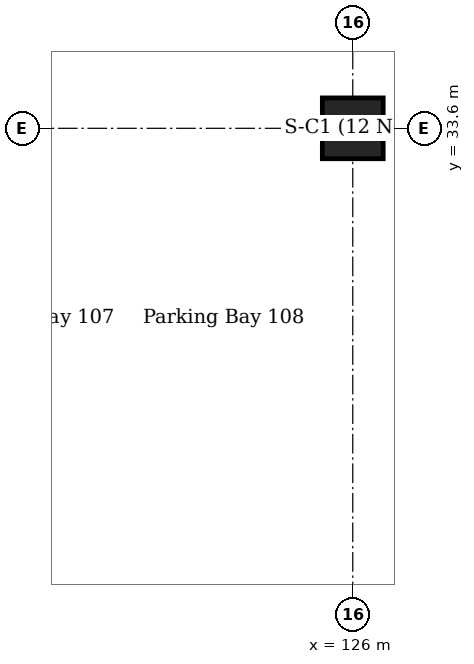
"""IFC4 building model, lengths in metres.
Left out: names, types, materials, properties, quantities, classifications, styles, units other than length and angle.
Written with IfcOpenShell. Run it as: python <this file> out.ifc"""

import sys

from ifc_helpers import new_model, si_unit, direction, frame, origin, origin_2d, place, context, subcontext, project, spatial, rectangle, extrude, element, save


model = new_model("IFC4")
c1 = context("Model", 3, precision=1e-05, world=origin(), true_north=direction((0.0, 1.0)))
c2 = subcontext(c1, "Body", "Model", "MODEL_VIEW")
j1 = project(units=[si_unit("LENGTHUNIT", "METRE"), si_unit("PLANEANGLEUNIT", "RADIAN")], contexts=[c1])
p1 = place(None, origin())
s1 = spatial("IfcSite", under=j1, at=p1, CompositionType="ELEMENT")
p2 = place(p1, origin())
s2 = spatial("IfcBuilding", under=s1, at=p2, CompositionType="ELEMENT")
p3 = place(p2, frame((0.0, 0.0, -5.4)))
s3 = spatial("IfcBuildingStorey", under=s2, at=p3, CompositionType="ELEMENT", Elevation=-5.4)
p4 = place(p3, frame((126.0, 33.6, 0.0), z_axis=(0.0, 0.0, 1.0), x_axis=(1.0, 0.0, 0.0)))
e1 = element("IfcColumn", 1, at=p4, inside=s3, PredefinedType="COLUMN", context=c2, shape_type="SweptSolid", body=[
    extrude(rectangle(XDim=0.8, YDim=0.8, at=origin_2d()), origin(), (0.0, 0.0, 1.0), 5.4),
])
save(model, sys.argv[1])
